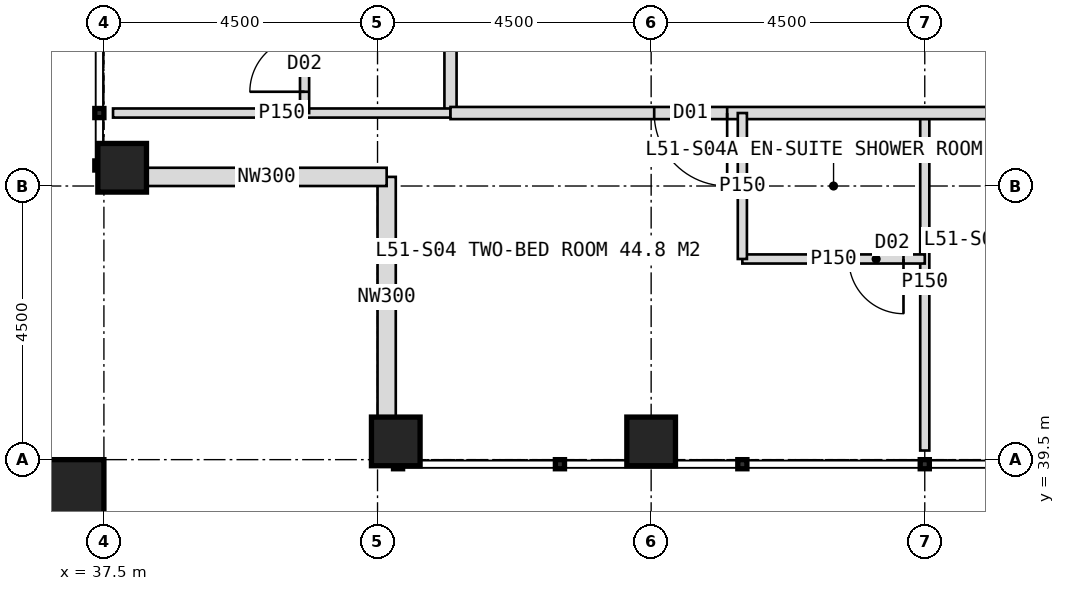
"""IFC4 building model, lengths in metres.
Left out: names, types, materials, properties, quantities, classifications, styles, units other than length and angle.
Written with IfcOpenShell. Run it as: python <this file> out.ifc"""

import sys

from ifc_helpers import new_model, si_unit, direction, frame, frame_2d, origin, origin_2d, place, context, subcontext, project, spatial, rectangle, hollow_rectangle, extrude, element, fill, save


model = new_model("IFC4")
c1 = context("Model", 3, precision=1e-05, world=origin(), true_north=direction((0.0, 1.0)))
c2 = subcontext(c1, "Body", "Model", "MODEL_VIEW")
j1 = project(units=[si_unit("LENGTHUNIT", "METRE"), si_unit("PLANEANGLEUNIT", "RADIAN")], contexts=[c1])
p1 = place(None, origin())
s1 = spatial("IfcSite", under=j1, at=p1, CompositionType="ELEMENT")
p2 = place(p1, origin())
s2 = spatial("IfcBuilding", under=s1, at=p2, CompositionType="ELEMENT")
p3 = place(p2, frame((0.0, 0.0, 213.0)))
s3 = spatial("IfcBuildingStorey", under=s2, at=p3, CompositionType="ELEMENT", Elevation=213.0)
for number, where, z_axis, x_axis in (
    (1, (42.3, 39.8, 0.0), (0.0, 0.0, 1.0), (1.0, 0.0, 0.0)),
    (2, (37.8, 44.3, 0.0), (0.0, 0.0, 1.0), (1.0, 0.0, 0.0)),
    (3, (46.5, 39.8, 0.0), (0.0, 0.0, 1.0), (1.0, 0.0, 0.0)),
):
    element("IfcColumn", number, at=place(p3, frame(where, z_axis=z_axis, x_axis=x_axis)), inside=s3, PredefinedType="COLUMN", context=c2, shape_type="SweptSolid", body=[
        extrude(hollow_rectangle(XDim=0.8, YDim=0.8, WallThickness=0.08, at=origin_2d()), origin(), (0.0, 0.0, 1.0), 4.0),
    ])
p4 = place(p3, frame((36.9, 38.9, 0.0), z_axis=(0.0, 0.0, 1.0), x_axis=(1.0, 0.0, 0.0)))
e4 = element("IfcColumn", 4, at=p4, inside=s3, PredefinedType="COLUMN", context=c2, shape_type="SweptSolid", body=[
    extrude(hollow_rectangle(XDim=1.2, YDim=1.2, WallThickness=0.07, at=origin_2d()), origin(), (0.0, 0.0, 1.0), 4.0),
])
for number, where, z_axis, x_axis in (
    (5, (42.15, 40.2, 0.0), (0.0, 0.0, 1.0), (0.0, 1.0, 0.0)),
    (6, (42.15, 44.15, 0.0), (0.0, 0.0, 1.0), (-1.0, 0.0, 0.0)),
):
    element("IfcWall", number, at=place(p3, frame(where, z_axis=z_axis, x_axis=x_axis)), inside=s3, PredefinedType="ELEMENTEDWALL", context=c2, shape_type="SweptSolid", body=[
        extrude(rectangle(XDim=3.95, YDim=0.3, at=frame_2d((1.975, 0.0))), origin(), (0.0, 0.0, 1.0), 2.85),
    ])
p5 = place(p3, frame((43.2, 45.2, 0.0), z_axis=(0.0, 0.0, 1.0), x_axis=(0.0, 1.0, 0.0)))
e7 = element("IfcWall", 7, at=p5, inside=s3, PredefinedType="PARTITIONING", context=c2, shape_type="SweptSolid", body=[
    extrude(rectangle(XDim=33.6, YDim=0.2, at=frame_2d((16.8, 0.0))), origin(), (0.0, 0.0, 1.0), 3.75),
])
p6 = place(p5, frame((3.25, 0.0, 0.0)))
e8 = element("IfcOpeningElement", 8, at=p6, cuts=e7, PredefinedType="OPENING", context=c2, shape_type="SweptSolid", body=[
    extrude(rectangle(XDim=1.2, YDim=2.2, at=frame_2d((0.6, 1.1))), frame((0.0, 0.11, 0.0), z_axis=(0.0, -1.0, 0.0), x_axis=(1.0, 0.0, 0.0)), (0.0, 0.0, 1.0), 0.22),
])
p7 = place(p5, frame((11.05, 0.0, 0.0)))
e9 = element("IfcOpeningElement", 9, at=p7, cuts=e7, PredefinedType="OPENING", context=c2, shape_type="SweptSolid", body=[
    extrude(rectangle(XDim=1.2, YDim=2.2, at=frame_2d((0.6, 1.1))), frame((0.0, 0.11, 0.0), z_axis=(0.0, -1.0, 0.0), x_axis=(1.0, 0.0, 0.0)), (0.0, 0.0, 1.0), 0.22),
])
p8 = place(p5, frame((20.05, 0.0, 0.0)))
e10 = element("IfcOpeningElement", 10, at=p8, cuts=e7, PredefinedType="OPENING", context=c2, shape_type="SweptSolid", body=[
    extrude(rectangle(XDim=1.2, YDim=2.2, at=frame_2d((0.6, 1.1))), frame((0.0, 0.11, 0.0), z_axis=(0.0, -1.0, 0.0), x_axis=(1.0, 0.0, 0.0)), (0.0, 0.0, 1.0), 0.22),
])
p9 = place(p5, frame((26.95, 0.0, 0.0)))
e11 = element("IfcOpeningElement", 11, at=p9, cuts=e7, PredefinedType="OPENING", context=c2, shape_type="SweptSolid", body=[
    extrude(rectangle(XDim=1.2, YDim=2.2, at=frame_2d((0.6, 1.1))), frame((0.0, 0.11, 0.0), z_axis=(0.0, -1.0, 0.0), x_axis=(1.0, 0.0, 0.0)), (0.0, 0.0, 1.0), 0.22),
])
p10 = place(p3, frame((43.2, 45.2, 0.0), z_axis=(0.0, 0.0, 1.0), x_axis=(-1.0, 0.0, 0.0)))
e12 = element("IfcWall", 12, at=p10, inside=s3, PredefinedType="PARTITIONING", context=c2, shape_type="SweptSolid", body=[
    extrude(rectangle(XDim=5.55, YDim=0.15, at=frame_2d((2.775, 0.0))), origin(), (0.0, 0.0, 1.0), 3.75),
])
p11 = place(p3, frame((40.8, 45.2, 0.0), z_axis=(0.0, 0.0, 1.0), x_axis=(0.0, 1.0, 0.0)))
e13 = element("IfcWall", 13, at=p11, inside=s3, PredefinedType="PARTITIONING", context=c2, shape_type="SweptSolid", body=[
    extrude(rectangle(XDim=3.0, YDim=0.15, at=frame_2d((1.5, 0.0))), origin(), (0.0, 0.0, 1.0), 3.75),
])
p12 = place(p11, frame((0.35, 0.0, 0.0)))
e14 = element("IfcOpeningElement", 14, at=p12, cuts=e13, PredefinedType="OPENING", context=c2, shape_type="SweptSolid", body=[
    extrude(rectangle(XDim=0.9, YDim=2.1, at=frame_2d((0.45, 1.05))), frame((0.0, 0.085, 0.0), z_axis=(0.0, -1.0, 0.0), x_axis=(1.0, 0.0, 0.0)), (0.0, 0.0, 1.0), 0.17),
])
p13 = place(p3, frame((51.0, 45.2, 0.0), z_axis=(0.0, 0.0, 1.0), x_axis=(0.0, -1.0, 0.0)))
e15 = element("IfcWall", 15, at=p13, inside=s3, PredefinedType="PARTITIONING", context=c2, shape_type="SweptSolid", body=[
    extrude(rectangle(XDim=5.55, YDim=0.15, at=frame_2d((2.775, 0.0))), origin(), (0.0, 0.0, 1.0), 3.75),
])
p14 = place(p3, frame((76.8, 45.2, 0.0), z_axis=(0.0, 0.0, 1.0), x_axis=(-1.0, 0.0, 0.0)))
e16 = element("IfcWall", 16, at=p14, inside=s3, PredefinedType="PARTITIONING", context=c2, shape_type="SweptSolid", body=[
    extrude(rectangle(XDim=33.6, YDim=0.2, at=frame_2d((16.8, 0.0))), origin(), (0.0, 0.0, 1.0), 3.75),
])
p15 = place(p14, frame((3.25, 0.0, 0.0)))
e17 = element("IfcOpeningElement", 17, at=p15, cuts=e16, PredefinedType="OPENING", context=c2, shape_type="SweptSolid", body=[
    extrude(rectangle(XDim=1.2, YDim=2.2, at=frame_2d((0.6, 1.1))), frame((0.0, 0.11, 0.0), z_axis=(0.0, -1.0, 0.0), x_axis=(1.0, 0.0, 0.0)), (0.0, 0.0, 1.0), 0.22),
])
p16 = place(p14, frame((11.05, 0.0, 0.0)))
e18 = element("IfcOpeningElement", 18, at=p16, cuts=e16, PredefinedType="OPENING", context=c2, shape_type="SweptSolid", body=[
    extrude(rectangle(XDim=1.2, YDim=2.2, at=frame_2d((0.6, 1.1))), frame((0.0, 0.11, 0.0), z_axis=(0.0, -1.0, 0.0), x_axis=(1.0, 0.0, 0.0)), (0.0, 0.0, 1.0), 0.22),
])
p17 = place(p14, frame((20.05, 0.0, 0.0)))
e19 = element("IfcOpeningElement", 19, at=p17, cuts=e16, PredefinedType="OPENING", context=c2, shape_type="SweptSolid", body=[
    extrude(rectangle(XDim=1.2, YDim=2.2, at=frame_2d((0.6, 1.1))), frame((0.0, 0.11, 0.0), z_axis=(0.0, -1.0, 0.0), x_axis=(1.0, 0.0, 0.0)), (0.0, 0.0, 1.0), 0.22),
])
p18 = place(p14, frame((29.05, 0.0, 0.0)))
e20 = element("IfcOpeningElement", 20, at=p18, cuts=e16, PredefinedType="OPENING", context=c2, shape_type="SweptSolid", body=[
    extrude(rectangle(XDim=1.2, YDim=2.2, at=frame_2d((0.6, 1.1))), frame((0.0, 0.11, 0.0), z_axis=(0.0, -1.0, 0.0), x_axis=(1.0, 0.0, 0.0)), (0.0, 0.0, 1.0), 0.22),
])
p19 = place(p3, frame((51.0, 42.8, 0.0), z_axis=(0.0, 0.0, 1.0), x_axis=(-1.0, 0.0, 0.0)))
e21 = element("IfcWall", 21, at=p19, inside=s3, PredefinedType="PARTITIONING", context=c2, shape_type="SweptSolid", body=[
    extrude(rectangle(XDim=3.0, YDim=0.15, at=frame_2d((1.5, 0.0))), origin(), (0.0, 0.0, 1.0), 3.75),
])
p20 = place(p19, frame((0.35, 0.0, 0.0)))
e22 = element("IfcOpeningElement", 22, at=p20, cuts=e21, PredefinedType="OPENING", context=c2, shape_type="SweptSolid", body=[
    extrude(rectangle(XDim=0.9, YDim=2.1, at=frame_2d((0.45, 1.05))), frame((0.0, 0.085, 0.0), z_axis=(0.0, -1.0, 0.0), x_axis=(1.0, 0.0, 0.0)), (0.0, 0.0, 1.0), 0.17),
])
p21 = place(p3, frame((48.0, 45.2, 0.0), z_axis=(0.0, 0.0, 1.0), x_axis=(0.0, -1.0, 0.0)))
e23 = element("IfcWall", 23, at=p21, inside=s3, PredefinedType="PARTITIONING", context=c2, shape_type="SweptSolid", body=[
    extrude(rectangle(XDim=2.4, YDim=0.15, at=frame_2d((1.2, 0.0))), origin(), (0.0, 0.0, 1.0), 3.75),
])
p22 = place(p12, origin())
e24 = element("IfcDoor", 24, at=p22, inside=s3, OperationType="SINGLE_SWING_LEFT", PredefinedType="DOOR", context=c2, shape_type="SweptSolid", body=[
    extrude(rectangle(XDim=0.9, YDim=2.1, at=frame_2d((0.45, 1.05))), frame((0.0, 0.025, 0.0), z_axis=(0.0, -1.0, 0.0), x_axis=(1.0, 0.0, 0.0)), (0.0, 0.0, 1.0), 0.05),
])
fill(e14, e24)
p23 = place(p18, origin())
e25 = element("IfcDoor", 25, at=p23, inside=s3, OperationType="SINGLE_SWING_LEFT", PredefinedType="DOOR", context=c2, shape_type="SweptSolid", body=[
    extrude(rectangle(XDim=1.2, YDim=2.2, at=frame_2d((0.6, 1.1))), frame((0.0, 0.025, 0.0), z_axis=(0.0, -1.0, 0.0), x_axis=(1.0, 0.0, 0.0)), (0.0, 0.0, 1.0), 0.05),
])
fill(e20, e25)
p24 = place(p20, origin())
e26 = element("IfcDoor", 26, at=p24, inside=s3, OperationType="SINGLE_SWING_LEFT", PredefinedType="DOOR", context=c2, shape_type="SweptSolid", body=[
    extrude(rectangle(XDim=0.9, YDim=2.1, at=frame_2d((0.45, 1.05))), frame((0.0, 0.025, 0.0), z_axis=(0.0, -1.0, 0.0), x_axis=(1.0, 0.0, 0.0)), (0.0, 0.0, 1.0), 0.05),
])
fill(e22, e26)
save(model, sys.argv[1])
